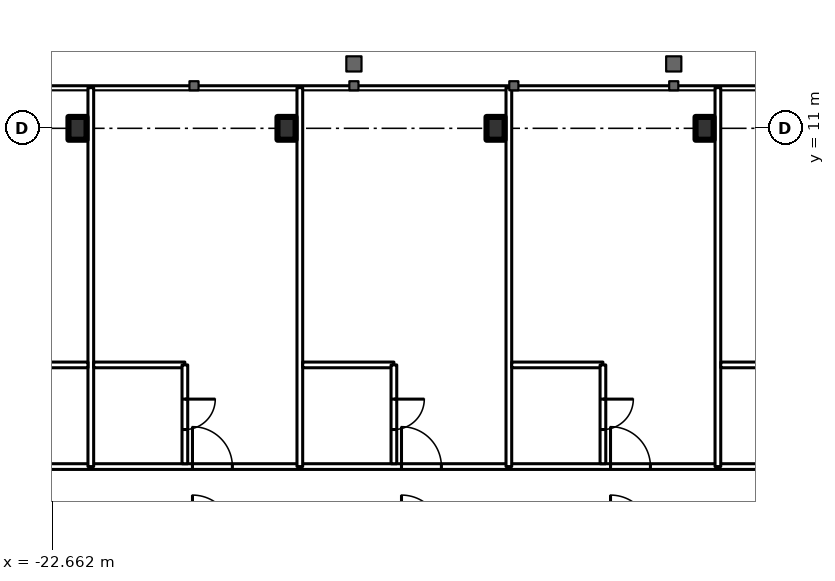
"""IFC4 building model, lengths in metres.
Left out: names, types, materials, properties, quantities, classifications, styles, units other than length and angle.
Written with IfcOpenShell. Run it as: python <this file> out.ifc"""

import sys

from ifc_helpers import new_model, si_unit, direction, frame, frame_2d, origin, origin_2d, place, context, subcontext, project, spatial, rectangle, i_section, extrude, element, fill, save


model = new_model("IFC4")
c1 = context("Model", 3, precision=1e-05, world=origin(), true_north=direction((0.0, 1.0)))
c2 = subcontext(c1, "Body", "Model", "MODEL_VIEW")
j1 = project(units=[si_unit("LENGTHUNIT", "METRE"), si_unit("PLANEANGLEUNIT", "RADIAN")], contexts=[c1])
p1 = place(None, origin())
s1 = spatial("IfcSite", under=j1, at=p1, CompositionType="ELEMENT")
p2 = place(p1, origin())
s2 = spatial("IfcBuilding", under=s1, at=p2, CompositionType="ELEMENT")
p3 = place(p2, frame((0.0, 0.0, 222.5)))
s3 = spatial("IfcBuildingStorey", under=s2, at=p3, CompositionType="ELEMENT", Elevation=222.5)
for number, where, z_axis, x_axis in (
    (1, (-22.0, 11.0, 0.0), (0.0, 0.0, 1.0), (1.0, 0.0, 0.0)),
    (2, (-16.5, 11.0, 0.0), (0.0, 0.0, 1.0), (1.0, 0.0, 0.0)),
    (3, (-11.0, 11.0, 0.0), (0.0, 0.0, 1.0), (1.0, 0.0, 0.0)),
    (4, (-5.5, 11.0, 0.0), (0.0, 0.0, 1.0), (1.0, 0.0, 0.0)),
):
    element("IfcColumn", number, at=place(p3, frame(where, z_axis=z_axis, x_axis=x_axis)), inside=s3, PredefinedType="COLUMN", context=c2, shape_type="SweptSolid", body=[
        extrude(i_section(OverallWidth=0.476, OverallDepth=0.6, WebThickness=0.1, FlangeThickness=0.14, FilletRadius=0.02, at=origin_2d()), origin(), (0.0, 0.0, 1.0), 3.6),
    ])
p4 = place(p3, frame((-27.5, 2.1, 0.0), z_axis=(0.0, 0.0, 1.0), x_axis=(1.0, 0.0, 0.0)))
e5 = element("IfcWall", 5, at=p4, inside=s3, PredefinedType="PARTITIONING", context=c2, shape_type="SweptSolid", body=[
    extrude(rectangle(XDim=55.0, YDim=0.15, at=frame_2d((27.5, 0.0))), origin(), (0.0, 0.0, 1.0), 3.4),
])
p5 = place(p4, frame((2.025, 0.0, 0.0)))
e6 = element("IfcOpeningElement", 6, at=p5, cuts=e5, PredefinedType="OPENING", context=c2, shape_type="SweptSolid", body=[
    extrude(rectangle(XDim=1.05, YDim=2.4, at=frame_2d((0.525, 1.2))), frame((0.0, 0.085, 0.0), z_axis=(0.0, -1.0, 0.0), x_axis=(1.0, 0.0, 0.0)), (0.0, 0.0, 1.0), 0.17),
])
p6 = place(p4, frame((8.525, 0.0, 0.0)))
e7 = element("IfcOpeningElement", 7, at=p6, cuts=e5, PredefinedType="OPENING", context=c2, shape_type="SweptSolid", body=[
    extrude(rectangle(XDim=1.05, YDim=2.4, at=frame_2d((0.525, 1.2))), frame((0.0, 0.085, 0.0), z_axis=(0.0, -1.0, 0.0), x_axis=(1.0, 0.0, 0.0)), (0.0, 0.0, 1.0), 0.17),
])
p7 = place(p4, frame((14.025, 0.0, 0.0)))
e8 = element("IfcOpeningElement", 8, at=p7, cuts=e5, PredefinedType="OPENING", context=c2, shape_type="SweptSolid", body=[
    extrude(rectangle(XDim=1.05, YDim=2.4, at=frame_2d((0.525, 1.2))), frame((0.0, 0.085, 0.0), z_axis=(0.0, -1.0, 0.0), x_axis=(1.0, 0.0, 0.0)), (0.0, 0.0, 1.0), 0.17),
])
p8 = place(p4, frame((19.525, 0.0, 0.0)))
e9 = element("IfcOpeningElement", 9, at=p8, cuts=e5, PredefinedType="OPENING", context=c2, shape_type="SweptSolid", body=[
    extrude(rectangle(XDim=1.05, YDim=2.4, at=frame_2d((0.525, 1.2))), frame((0.0, 0.085, 0.0), z_axis=(0.0, -1.0, 0.0), x_axis=(1.0, 0.0, 0.0)), (0.0, 0.0, 1.0), 0.17),
])
p9 = place(p4, frame((25.025, 0.0, 0.0)))
e10 = element("IfcOpeningElement", 10, at=p9, cuts=e5, PredefinedType="OPENING", context=c2, shape_type="SweptSolid", body=[
    extrude(rectangle(XDim=1.05, YDim=2.4, at=frame_2d((0.525, 1.2))), frame((0.0, 0.085, 0.0), z_axis=(0.0, -1.0, 0.0), x_axis=(1.0, 0.0, 0.0)), (0.0, 0.0, 1.0), 0.17),
])
p10 = place(p4, frame((30.525, 0.0, 0.0)))
e11 = element("IfcOpeningElement", 11, at=p10, cuts=e5, PredefinedType="OPENING", context=c2, shape_type="SweptSolid", body=[
    extrude(rectangle(XDim=1.05, YDim=2.4, at=frame_2d((0.525, 1.2))), frame((0.0, 0.085, 0.0), z_axis=(0.0, -1.0, 0.0), x_axis=(1.0, 0.0, 0.0)), (0.0, 0.0, 1.0), 0.17),
])
p11 = place(p4, frame((36.025, 0.0, 0.0)))
e12 = element("IfcOpeningElement", 12, at=p11, cuts=e5, PredefinedType="OPENING", context=c2, shape_type="SweptSolid", body=[
    extrude(rectangle(XDim=1.05, YDim=2.4, at=frame_2d((0.525, 1.2))), frame((0.0, 0.085, 0.0), z_axis=(0.0, -1.0, 0.0), x_axis=(1.0, 0.0, 0.0)), (0.0, 0.0, 1.0), 0.17),
])
p12 = place(p4, frame((41.525, 0.0, 0.0)))
e13 = element("IfcOpeningElement", 13, at=p12, cuts=e5, PredefinedType="OPENING", context=c2, shape_type="SweptSolid", body=[
    extrude(rectangle(XDim=1.05, YDim=2.4, at=frame_2d((0.525, 1.2))), frame((0.0, 0.085, 0.0), z_axis=(0.0, -1.0, 0.0), x_axis=(1.0, 0.0, 0.0)), (0.0, 0.0, 1.0), 0.17),
])
p13 = place(p4, frame((47.025, 0.0, 0.0)))
e14 = element("IfcOpeningElement", 14, at=p13, cuts=e5, PredefinedType="OPENING", context=c2, shape_type="SweptSolid", body=[
    extrude(rectangle(XDim=1.05, YDim=2.4, at=frame_2d((0.525, 1.2))), frame((0.0, 0.085, 0.0), z_axis=(0.0, -1.0, 0.0), x_axis=(1.0, 0.0, 0.0)), (0.0, 0.0, 1.0), 0.17),
])
p14 = place(p4, frame((52.525, 0.0, 0.0)))
e15 = element("IfcOpeningElement", 15, at=p14, cuts=e5, PredefinedType="OPENING", context=c2, shape_type="SweptSolid", body=[
    extrude(rectangle(XDim=1.05, YDim=2.4, at=frame_2d((0.525, 1.2))), frame((0.0, 0.085, 0.0), z_axis=(0.0, -1.0, 0.0), x_axis=(1.0, 0.0, 0.0)), (0.0, 0.0, 1.0), 0.17),
])
for number, where, z_axis, x_axis in (
    (16, (-21.65, 2.1, 0.0), (0.0, 0.0, 1.0), (0.0, 1.0, 0.0)),
    (17, (-16.15, 2.1, 0.0), (0.0, 0.0, 1.0), (0.0, 1.0, 0.0)),
    (18, (-10.65, 2.1, 0.0), (0.0, 0.0, 1.0), (0.0, 1.0, 0.0)),
    (19, (-5.15, 2.1, 0.0), (0.0, 0.0, 1.0), (0.0, 1.0, 0.0)),
):
    element("IfcWall", number, at=place(p3, frame(where, z_axis=z_axis, x_axis=x_axis)), inside=s3, PredefinedType="PARTITIONING", context=c2, shape_type="SweptSolid", body=[
        extrude(rectangle(XDim=9.97, YDim=0.15, at=frame_2d((4.985, 0.0))), origin(), (0.0, 0.0, 1.0), 3.4),
    ])
for number, where, z_axis, x_axis in (
    (20, (-24.125, 4.775, 0.0), (0.0, 0.0, 1.0), (1.0, 0.0, 0.0)),
    (21, (-21.575, 4.775, 0.0), (0.0, 0.0, 1.0), (1.0, 0.0, 0.0)),
):
    element("IfcWall", number, at=place(p3, frame(where, z_axis=z_axis, x_axis=x_axis)), inside=s3, PredefinedType="PARTITIONING", context=c2, shape_type="SweptSolid", body=[
        extrude(rectangle(XDim=2.4, YDim=0.15, at=frame_2d((1.2, 0.0))), origin(), (0.0, 0.0, 1.0), 3.4),
    ])
p15 = place(p3, frame((-19.175, 2.175, 0.0), z_axis=(0.0, 0.0, 1.0), x_axis=(0.0, 1.0, 0.0)))
e22 = element("IfcWall", 22, at=p15, inside=s3, PredefinedType="PARTITIONING", context=c2, shape_type="SweptSolid", body=[
    extrude(rectangle(XDim=2.6, YDim=0.15, at=frame_2d((1.3, 0.0))), origin(), (0.0, 0.0, 1.0), 3.4),
])
p16 = place(p15, frame((0.9, 0.0, 0.0)))
e23 = element("IfcOpeningElement", 23, at=p16, cuts=e22, PredefinedType="OPENING", context=c2, shape_type="SweptSolid", body=[
    extrude(rectangle(XDim=0.8, YDim=2.2, at=frame_2d((0.4, 1.1))), frame((0.0, 0.085, 0.0), z_axis=(0.0, -1.0, 0.0), x_axis=(1.0, 0.0, 0.0)), (0.0, 0.0, 1.0), 0.17),
])
p17 = place(p3, frame((-16.075, 4.775, 0.0), z_axis=(0.0, 0.0, 1.0), x_axis=(1.0, 0.0, 0.0)))
e24 = element("IfcWall", 24, at=p17, inside=s3, PredefinedType="PARTITIONING", context=c2, shape_type="SweptSolid", body=[
    extrude(rectangle(XDim=2.4, YDim=0.15, at=frame_2d((1.2, 0.0))), origin(), (0.0, 0.0, 1.0), 3.4),
])
p18 = place(p3, frame((-13.675, 2.175, 0.0), z_axis=(0.0, 0.0, 1.0), x_axis=(0.0, 1.0, 0.0)))
e25 = element("IfcWall", 25, at=p18, inside=s3, PredefinedType="PARTITIONING", context=c2, shape_type="SweptSolid", body=[
    extrude(rectangle(XDim=2.6, YDim=0.15, at=frame_2d((1.3, 0.0))), origin(), (0.0, 0.0, 1.0), 3.4),
])
p19 = place(p18, frame((0.9, 0.0, 0.0)))
e26 = element("IfcOpeningElement", 26, at=p19, cuts=e25, PredefinedType="OPENING", context=c2, shape_type="SweptSolid", body=[
    extrude(rectangle(XDim=0.8, YDim=2.2, at=frame_2d((0.4, 1.1))), frame((0.0, 0.085, 0.0), z_axis=(0.0, -1.0, 0.0), x_axis=(1.0, 0.0, 0.0)), (0.0, 0.0, 1.0), 0.17),
])
p20 = place(p3, frame((-10.575, 4.775, 0.0), z_axis=(0.0, 0.0, 1.0), x_axis=(1.0, 0.0, 0.0)))
e27 = element("IfcWall", 27, at=p20, inside=s3, PredefinedType="PARTITIONING", context=c2, shape_type="SweptSolid", body=[
    extrude(rectangle(XDim=2.4, YDim=0.15, at=frame_2d((1.2, 0.0))), origin(), (0.0, 0.0, 1.0), 3.4),
])
p21 = place(p3, frame((-8.175, 2.175, 0.0), z_axis=(0.0, 0.0, 1.0), x_axis=(0.0, 1.0, 0.0)))
e28 = element("IfcWall", 28, at=p21, inside=s3, PredefinedType="PARTITIONING", context=c2, shape_type="SweptSolid", body=[
    extrude(rectangle(XDim=2.6, YDim=0.15, at=frame_2d((1.3, 0.0))), origin(), (0.0, 0.0, 1.0), 3.4),
])
p22 = place(p21, frame((0.9, 0.0, 0.0)))
e29 = element("IfcOpeningElement", 29, at=p22, cuts=e28, PredefinedType="OPENING", context=c2, shape_type="SweptSolid", body=[
    extrude(rectangle(XDim=0.8, YDim=2.2, at=frame_2d((0.4, 1.1))), frame((0.0, 0.085, 0.0), z_axis=(0.0, -1.0, 0.0), x_axis=(1.0, 0.0, 0.0)), (0.0, 0.0, 1.0), 0.17),
])
p23 = place(p3, frame((-5.075, 4.775, 0.0), z_axis=(0.0, 0.0, 1.0), x_axis=(1.0, 0.0, 0.0)))
e30 = element("IfcWall", 30, at=p23, inside=s3, PredefinedType="PARTITIONING", context=c2, shape_type="SweptSolid", body=[
    extrude(rectangle(XDim=2.4, YDim=0.15, at=frame_2d((1.2, 0.0))), origin(), (0.0, 0.0, 1.0), 3.4),
])
p24 = place(p16, origin())
e31 = element("IfcDoor", 31, at=p24, inside=s3, OperationType="SINGLE_SWING_RIGHT", PredefinedType="DOOR", context=c2, shape_type="SweptSolid", body=[
    extrude(rectangle(XDim=0.8, YDim=2.2, at=frame_2d((0.4, 1.1))), frame((0.0, 0.025, 0.0), z_axis=(0.0, -1.0, 0.0), x_axis=(1.0, 0.0, 0.0)), (0.0, 0.0, 1.0), 0.05),
])
fill(e23, e31)
p25 = place(p6, origin())
e32 = element("IfcDoor", 32, at=p25, inside=s3, OperationType="SINGLE_SWING_LEFT", PredefinedType="DOOR", context=c2, shape_type="SweptSolid", body=[
    extrude(rectangle(XDim=1.05, YDim=2.4, at=frame_2d((0.525, 1.2))), frame((0.0, 0.025, 0.0), z_axis=(0.0, -1.0, 0.0), x_axis=(1.0, 0.0, 0.0)), (0.0, 0.0, 1.0), 0.05),
])
fill(e7, e32)
p26 = place(p19, origin())
e33 = element("IfcDoor", 33, at=p26, inside=s3, OperationType="SINGLE_SWING_RIGHT", PredefinedType="DOOR", context=c2, shape_type="SweptSolid", body=[
    extrude(rectangle(XDim=0.8, YDim=2.2, at=frame_2d((0.4, 1.1))), frame((0.0, 0.025, 0.0), z_axis=(0.0, -1.0, 0.0), x_axis=(1.0, 0.0, 0.0)), (0.0, 0.0, 1.0), 0.05),
])
fill(e26, e33)
p27 = place(p7, origin())
e34 = element("IfcDoor", 34, at=p27, inside=s3, OperationType="SINGLE_SWING_LEFT", PredefinedType="DOOR", context=c2, shape_type="SweptSolid", body=[
    extrude(rectangle(XDim=1.05, YDim=2.4, at=frame_2d((0.525, 1.2))), frame((0.0, 0.025, 0.0), z_axis=(0.0, -1.0, 0.0), x_axis=(1.0, 0.0, 0.0)), (0.0, 0.0, 1.0), 0.05),
])
fill(e8, e34)
p28 = place(p22, origin())
e35 = element("IfcDoor", 35, at=p28, inside=s3, OperationType="SINGLE_SWING_RIGHT", PredefinedType="DOOR", context=c2, shape_type="SweptSolid", body=[
    extrude(rectangle(XDim=0.8, YDim=2.2, at=frame_2d((0.4, 1.1))), frame((0.0, 0.025, 0.0), z_axis=(0.0, -1.0, 0.0), x_axis=(1.0, 0.0, 0.0)), (0.0, 0.0, 1.0), 0.05),
])
fill(e29, e35)
p29 = place(p8, origin())
e36 = element("IfcDoor", 36, at=p29, inside=s3, OperationType="SINGLE_SWING_LEFT", PredefinedType="DOOR", context=c2, shape_type="SweptSolid", body=[
    extrude(rectangle(XDim=1.05, YDim=2.4, at=frame_2d((0.525, 1.2))), frame((0.0, 0.025, 0.0), z_axis=(0.0, -1.0, 0.0), x_axis=(1.0, 0.0, 0.0)), (0.0, 0.0, 1.0), 0.05),
])
fill(e9, e36)
save(model, sys.argv[1])
